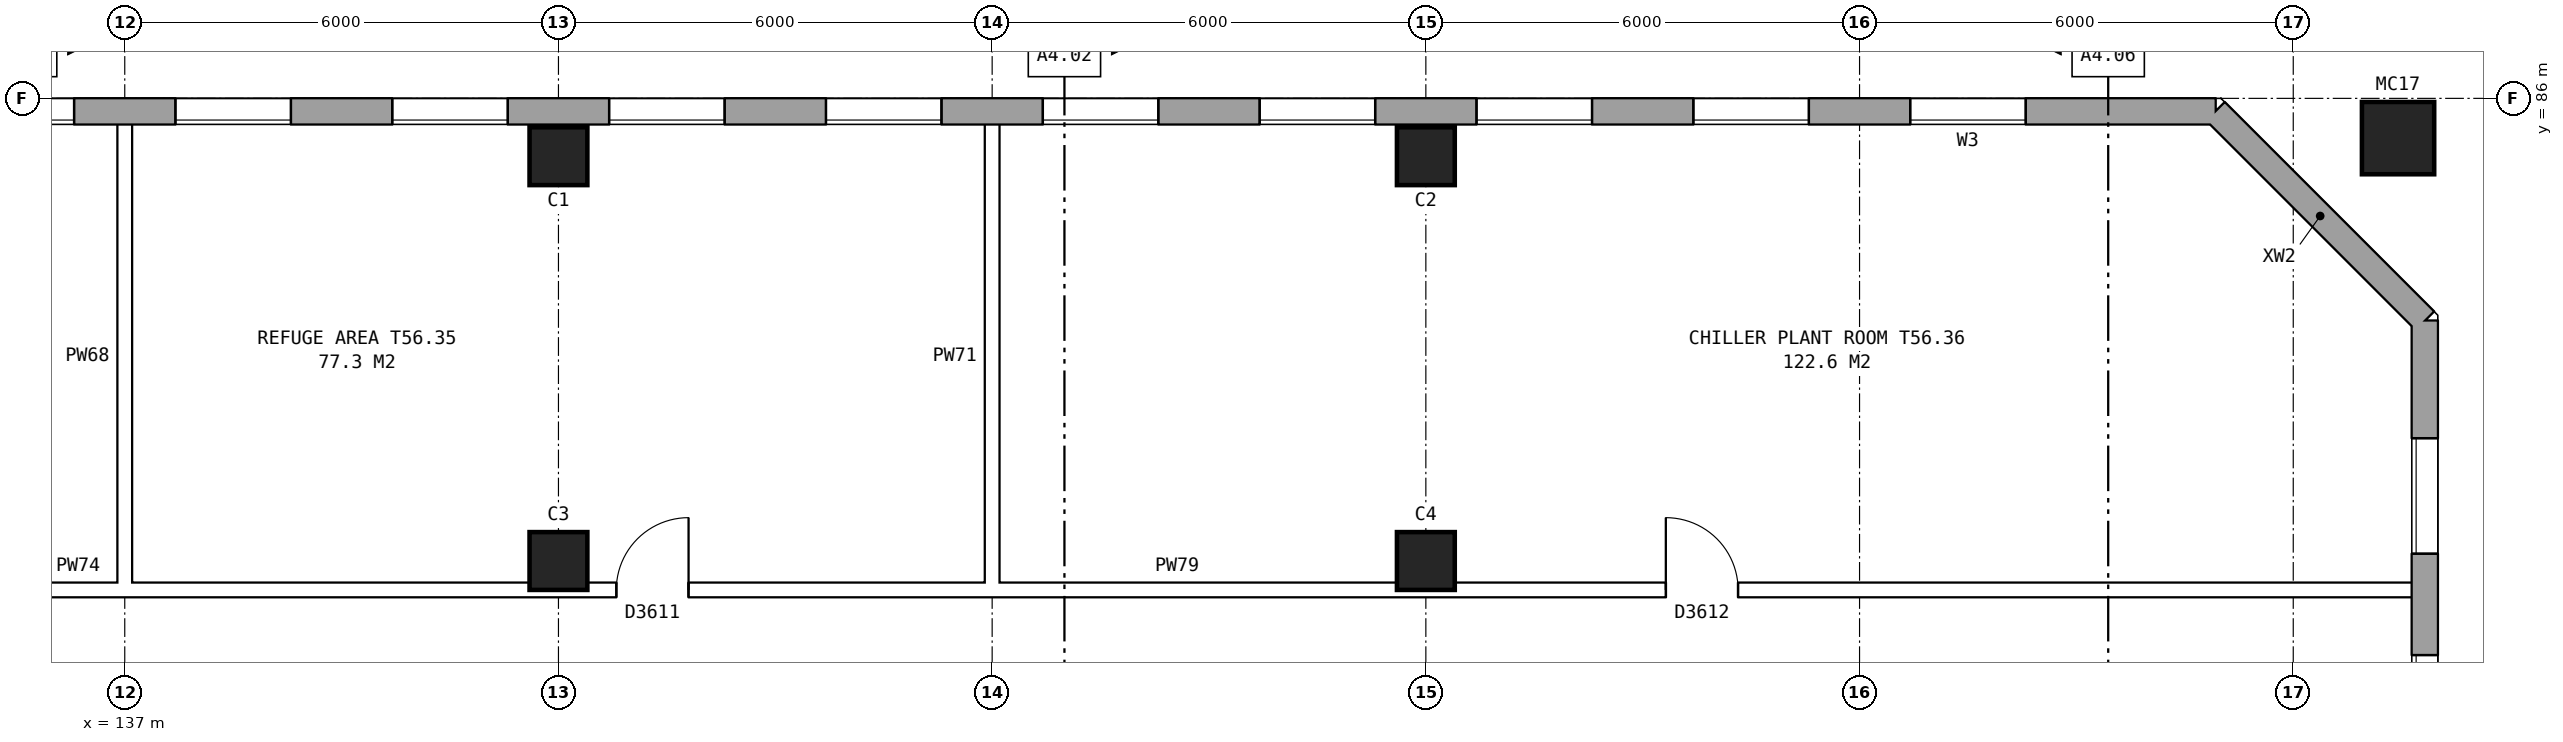
"""IFC4 building model, lengths in metres.
Left out: names, types, materials, properties, quantities, classifications, styles, units other than length and angle.
Written with IfcOpenShell. Run it as: python <this file> out.ifc"""

import sys

from ifc_helpers import new_model, si_unit, direction, frame, frame_2d, origin, origin_2d, place, context, subcontext, project, spatial, rectangle, hollow_rectangle, extrude, element, fill, save


model = new_model("IFC4")
c1 = context("Model", 3, precision=1e-05, world=origin(), true_north=direction((0.0, 1.0)))
c2 = subcontext(c1, "Body", "Model", "MODEL_VIEW")
j1 = project(units=[si_unit("LENGTHUNIT", "METRE"), si_unit("PLANEANGLEUNIT", "RADIAN")], contexts=[c1])
p1 = place(None, origin())
s1 = spatial("IfcSite", under=j1, at=p1, CompositionType="ELEMENT")
p2 = place(p1, origin())
s2 = spatial("IfcBuilding", under=s1, at=p2, CompositionType="ELEMENT")
p3 = place(p2, frame((0.0, 0.0, 198.6)))
s3 = spatial("IfcBuildingStorey", under=s2, at=p3, CompositionType="ELEMENT", Elevation=198.6)
for number, where, z_axis, x_axis in (
    (1, (143.0, 79.6, 0.0), (0.0, 0.0, 1.0), (1.0, 0.0, 0.0)),
    (2, (143.0, 85.2, 0.0), (0.0, 0.0, 1.0), (1.0, 0.0, 0.0)),
    (3, (155.0, 79.6, 0.0), (0.0, 0.0, 1.0), (1.0, 0.0, 0.0)),
    (4, (155.0, 85.2, 0.0), (0.0, 0.0, 1.0), (1.0, 0.0, 0.0)),
):
    element("IfcColumn", number, at=place(p3, frame(where, z_axis=z_axis, x_axis=x_axis)), inside=s3, PredefinedType="COLUMN", context=c2, shape_type="SweptSolid", body=[
        extrude(rectangle(XDim=0.8, YDim=0.8, at=origin_2d()), origin(), (0.0, 0.0, 1.0), 3.7),
    ])
p4 = place(p3, frame((168.45, 85.45, 0.0), z_axis=(0.0, 0.0, 1.0), x_axis=(1.0, 0.0, 0.0)))
e5 = element("IfcColumn", 5, at=p4, inside=s3, PredefinedType="COLUMN", context=c2, shape_type="SweptSolid", body=[
    extrude(hollow_rectangle(XDim=1.0, YDim=1.0, WallThickness=0.055, at=origin_2d()), origin(), (0.0, 0.0, 1.0), 4.2),
])
p5 = place(p3, frame((168.82, 57.075, 0.0), z_axis=(0.0, 0.0, 1.0), x_axis=(0.0, 1.0, 0.0)))
e6 = element("IfcWall", 6, at=p5, inside=s3, PredefinedType="STANDARD", context=c2, shape_type="SweptSolid", body=[
    extrude(rectangle(XDim=25.851, YDim=0.36, at=frame_2d((12.925, 0.0))), origin(), (0.0, 0.0, 1.0), 3.7),
])
p6 = place(p5, frame((1.625, 0.0, 1.5)))
e7 = element("IfcOpeningElement", 7, at=p6, cuts=e6, PredefinedType="OPENING", context=c2, shape_type="SweptSolid", body=[
    extrude(rectangle(XDim=1.6, YDim=1.2, at=frame_2d((0.8, 0.6))), frame((0.0, 0.19, 0.0), z_axis=(0.0, -1.0, 0.0), x_axis=(1.0, 0.0, 0.0)), (0.0, 0.0, 1.0), 0.38),
])
p7 = place(p5, frame((4.625, 0.0, 1.5)))
e8 = element("IfcOpeningElement", 8, at=p7, cuts=e6, PredefinedType="OPENING", context=c2, shape_type="SweptSolid", body=[
    extrude(rectangle(XDim=1.6, YDim=1.2, at=frame_2d((0.8, 0.6))), frame((0.0, 0.19, 0.0), z_axis=(0.0, -1.0, 0.0), x_axis=(1.0, 0.0, 0.0)), (0.0, 0.0, 1.0), 0.38),
])
p8 = place(p5, frame((19.625, 0.0, 1.5)))
e9 = element("IfcOpeningElement", 9, at=p8, cuts=e6, PredefinedType="OPENING", context=c2, shape_type="SweptSolid", body=[
    extrude(rectangle(XDim=1.6, YDim=1.2, at=frame_2d((0.8, 0.6))), frame((0.0, 0.19, 0.0), z_axis=(0.0, -1.0, 0.0), x_axis=(1.0, 0.0, 0.0)), (0.0, 0.0, 1.0), 0.38),
])
p9 = place(p5, frame((22.625, 0.0, 1.5)))
e10 = element("IfcOpeningElement", 10, at=p9, cuts=e6, PredefinedType="OPENING", context=c2, shape_type="SweptSolid", body=[
    extrude(rectangle(XDim=1.6, YDim=1.2, at=frame_2d((0.8, 0.6))), frame((0.0, 0.19, 0.0), z_axis=(0.0, -1.0, 0.0), x_axis=(1.0, 0.0, 0.0)), (0.0, 0.0, 1.0), 0.38),
])
p10 = place(p3, frame((168.82, 82.925, 0.0), z_axis=(0.0, 0.0, 1.0), x_axis=(-0.707106781187, 0.707106781187, 0.0)))
e11 = element("IfcWall", 11, at=p10, inside=s3, PredefinedType="STANDARD", context=c2, shape_type="SweptSolid", body=[
    extrude(rectangle(XDim=4.094, YDim=0.36, at=frame_2d((2.047, 0.0))), origin(), (0.0, 0.0, 1.0), 3.7),
])
p11 = place(p3, frame((165.925, 85.82, 0.0), z_axis=(0.0, 0.0, 1.0), x_axis=(-1.0, 0.0, 0.0)))
e12 = element("IfcWall", 12, at=p11, inside=s3, PredefinedType="STANDARD", context=c2, shape_type="SweptSolid", body=[
    extrude(rectangle(XDim=33.875, YDim=0.36, at=frame_2d((16.938, 0.0))), origin(), (0.0, 0.0, 1.0), 3.7),
])
p12 = place(p11, frame((2.625, 0.0, 1.5)))
e13 = element("IfcOpeningElement", 13, at=p12, cuts=e12, PredefinedType="OPENING", context=c2, shape_type="SweptSolid", body=[
    extrude(rectangle(XDim=1.6, YDim=1.2, at=frame_2d((0.8, 0.6))), frame((0.0, 0.19, 0.0), z_axis=(0.0, -1.0, 0.0), x_axis=(1.0, 0.0, 0.0)), (0.0, 0.0, 1.0), 0.38),
])
p13 = place(p11, frame((5.625, 0.0, 1.5)))
e14 = element("IfcOpeningElement", 14, at=p13, cuts=e12, PredefinedType="OPENING", context=c2, shape_type="SweptSolid", body=[
    extrude(rectangle(XDim=1.6, YDim=1.2, at=frame_2d((0.8, 0.6))), frame((0.0, 0.19, 0.0), z_axis=(0.0, -1.0, 0.0), x_axis=(1.0, 0.0, 0.0)), (0.0, 0.0, 1.0), 0.38),
])
p14 = place(p11, frame((8.625, 0.0, 1.5)))
e15 = element("IfcOpeningElement", 15, at=p14, cuts=e12, PredefinedType="OPENING", context=c2, shape_type="SweptSolid", body=[
    extrude(rectangle(XDim=1.6, YDim=1.2, at=frame_2d((0.8, 0.6))), frame((0.0, 0.19, 0.0), z_axis=(0.0, -1.0, 0.0), x_axis=(1.0, 0.0, 0.0)), (0.0, 0.0, 1.0), 0.38),
])
p15 = place(p11, frame((11.625, 0.0, 1.5)))
e16 = element("IfcOpeningElement", 16, at=p15, cuts=e12, PredefinedType="OPENING", context=c2, shape_type="SweptSolid", body=[
    extrude(rectangle(XDim=1.6, YDim=1.2, at=frame_2d((0.8, 0.6))), frame((0.0, 0.19, 0.0), z_axis=(0.0, -1.0, 0.0), x_axis=(1.0, 0.0, 0.0)), (0.0, 0.0, 1.0), 0.38),
])
p16 = place(p11, frame((14.625, 0.0, 1.5)))
e17 = element("IfcOpeningElement", 17, at=p16, cuts=e12, PredefinedType="OPENING", context=c2, shape_type="SweptSolid", body=[
    extrude(rectangle(XDim=1.6, YDim=1.2, at=frame_2d((0.8, 0.6))), frame((0.0, 0.19, 0.0), z_axis=(0.0, -1.0, 0.0), x_axis=(1.0, 0.0, 0.0)), (0.0, 0.0, 1.0), 0.38),
])
p17 = place(p11, frame((17.625, 0.0, 1.5)))
e18 = element("IfcOpeningElement", 18, at=p17, cuts=e12, PredefinedType="OPENING", context=c2, shape_type="SweptSolid", body=[
    extrude(rectangle(XDim=1.6, YDim=1.2, at=frame_2d((0.8, 0.6))), frame((0.0, 0.19, 0.0), z_axis=(0.0, -1.0, 0.0), x_axis=(1.0, 0.0, 0.0)), (0.0, 0.0, 1.0), 0.38),
])
p18 = place(p11, frame((20.625, 0.0, 1.5)))
e19 = element("IfcOpeningElement", 19, at=p18, cuts=e12, PredefinedType="OPENING", context=c2, shape_type="SweptSolid", body=[
    extrude(rectangle(XDim=1.6, YDim=1.2, at=frame_2d((0.8, 0.6))), frame((0.0, 0.19, 0.0), z_axis=(0.0, -1.0, 0.0), x_axis=(1.0, 0.0, 0.0)), (0.0, 0.0, 1.0), 0.38),
])
p19 = place(p11, frame((23.625, 0.0, 1.5)))
e20 = element("IfcOpeningElement", 20, at=p19, cuts=e12, PredefinedType="OPENING", context=c2, shape_type="SweptSolid", body=[
    extrude(rectangle(XDim=1.6, YDim=1.2, at=frame_2d((0.8, 0.6))), frame((0.0, 0.19, 0.0), z_axis=(0.0, -1.0, 0.0), x_axis=(1.0, 0.0, 0.0)), (0.0, 0.0, 1.0), 0.38),
])
p20 = place(p11, frame((26.625, 0.0, 1.5)))
e21 = element("IfcOpeningElement", 21, at=p20, cuts=e12, PredefinedType="OPENING", context=c2, shape_type="SweptSolid", body=[
    extrude(rectangle(XDim=1.6, YDim=1.2, at=frame_2d((0.8, 0.6))), frame((0.0, 0.19, 0.0), z_axis=(0.0, -1.0, 0.0), x_axis=(1.0, 0.0, 0.0)), (0.0, 0.0, 1.0), 0.38),
])
p21 = place(p11, frame((29.625, 0.0, 1.5)))
e22 = element("IfcOpeningElement", 22, at=p21, cuts=e12, PredefinedType="OPENING", context=c2, shape_type="SweptSolid", body=[
    extrude(rectangle(XDim=1.6, YDim=1.2, at=frame_2d((0.8, 0.6))), frame((0.0, 0.19, 0.0), z_axis=(0.0, -1.0, 0.0), x_axis=(1.0, 0.0, 0.0)), (0.0, 0.0, 1.0), 0.38),
])
p22 = place(p3, frame((136.9, 79.2, 0.0), z_axis=(0.0, 0.0, 1.0), x_axis=(1.0, 0.0, 0.0)))
e23 = element("IfcWall", 23, at=p22, inside=s3, PredefinedType="PARTITIONING", context=c2, shape_type="SweptSolid", body=[
    extrude(rectangle(XDim=31.86, YDim=0.2, at=frame_2d((15.93, 0.0))), origin(), (0.0, 0.0, 1.0), 3.7),
])
p23 = place(p22, frame((6.9, 0.0, 0.0)))
e24 = element("IfcOpeningElement", 24, at=p23, cuts=e23, PredefinedType="OPENING", context=c2, shape_type="SweptSolid", body=[
    extrude(rectangle(XDim=1.0, YDim=2.1, at=frame_2d((0.5, 1.05))), frame((0.0, 0.11, 0.0), z_axis=(0.0, -1.0, 0.0), x_axis=(1.0, 0.0, 0.0)), (0.0, 0.0, 1.0), 0.22),
])
p24 = place(p22, frame((21.42, 0.0, 0.0)))
e25 = element("IfcOpeningElement", 25, at=p24, cuts=e23, PredefinedType="OPENING", context=c2, shape_type="SweptSolid", body=[
    extrude(rectangle(XDim=1.0, YDim=2.1, at=frame_2d((0.5, 1.05))), frame((0.0, 0.11, 0.0), z_axis=(0.0, -1.0, 0.0), x_axis=(1.0, 0.0, 0.0)), (0.0, 0.0, 1.0), 0.22),
])
p25 = place(p3, frame((131.26, 79.2, 0.0), z_axis=(0.0, 0.0, 1.0), x_axis=(1.0, 0.0, 0.0)))
e26 = element("IfcWall", 26, at=p25, inside=s3, PredefinedType="PARTITIONING", context=c2, shape_type="SweptSolid", body=[
    extrude(rectangle(XDim=5.84, YDim=0.2, at=frame_2d((2.92, 0.0))), origin(), (0.0, 0.0, 1.0), 3.7),
])
p26 = place(p25, frame((2.42, 0.0, 0.0)))
e27 = element("IfcOpeningElement", 27, at=p26, cuts=e26, PredefinedType="OPENING", context=c2, shape_type="SweptSolid", body=[
    extrude(rectangle(XDim=1.0, YDim=2.1, at=frame_2d((0.5, 1.05))), frame((0.0, 0.11, 0.0), z_axis=(0.0, -1.0, 0.0), x_axis=(1.0, 0.0, 0.0)), (0.0, 0.0, 1.0), 0.22),
])
for number, where, z_axis, x_axis in (
    (28, (137.0, 79.1, 0.0), (0.0, 0.0, 1.0), (0.0, 1.0, 0.0)),
    (29, (149.0, 79.1, 0.0), (0.0, 0.0, 1.0), (0.0, 1.0, 0.0)),
):
    element("IfcWall", number, at=place(p3, frame(where, z_axis=z_axis, x_axis=x_axis)), inside=s3, PredefinedType="PARTITIONING", context=c2, shape_type="SweptSolid", body=[
        extrude(rectangle(XDim=6.66, YDim=0.2, at=frame_2d((3.33, 0.0))), origin(), (0.0, 0.0, 1.0), 3.7),
    ])
p27 = place(p8, origin())
e30 = element("IfcWindow", 30, at=p27, inside=s3, PartitioningType="DOUBLE_PANEL_HORIZONTAL", PredefinedType="WINDOW", context=c2, shape_type="SweptSolid", body=[
    extrude(rectangle(XDim=1.6, YDim=1.2, at=frame_2d((0.8, 0.6))), frame((0.0, 0.15, 0.0), z_axis=(0.0, -1.0, 0.0), x_axis=(1.0, 0.0, 0.0)), (0.0, 0.0, 1.0), 0.06),
])
fill(e9, e30)
p28 = place(p9, origin())
e31 = element("IfcWindow", 31, at=p28, inside=s3, PartitioningType="DOUBLE_PANEL_HORIZONTAL", PredefinedType="WINDOW", context=c2, shape_type="SweptSolid", body=[
    extrude(rectangle(XDim=1.6, YDim=1.2, at=frame_2d((0.8, 0.6))), frame((0.0, 0.15, 0.0), z_axis=(0.0, -1.0, 0.0), x_axis=(1.0, 0.0, 0.0)), (0.0, 0.0, 1.0), 0.06),
])
fill(e10, e31)
p29 = place(p12, origin())
e32 = element("IfcWindow", 32, at=p29, inside=s3, PartitioningType="DOUBLE_PANEL_HORIZONTAL", PredefinedType="WINDOW", context=c2, shape_type="SweptSolid", body=[
    extrude(rectangle(XDim=1.6, YDim=1.2, at=frame_2d((0.8, 0.6))), frame((0.0, 0.15, 0.0), z_axis=(0.0, -1.0, 0.0), x_axis=(1.0, 0.0, 0.0)), (0.0, 0.0, 1.0), 0.06),
])
fill(e13, e32)
p30 = place(p13, origin())
e33 = element("IfcWindow", 33, at=p30, inside=s3, PartitioningType="DOUBLE_PANEL_HORIZONTAL", PredefinedType="WINDOW", context=c2, shape_type="SweptSolid", body=[
    extrude(rectangle(XDim=1.6, YDim=1.2, at=frame_2d((0.8, 0.6))), frame((0.0, 0.15, 0.0), z_axis=(0.0, -1.0, 0.0), x_axis=(1.0, 0.0, 0.0)), (0.0, 0.0, 1.0), 0.06),
])
fill(e14, e33)
p31 = place(p14, origin())
e34 = element("IfcWindow", 34, at=p31, inside=s3, PartitioningType="DOUBLE_PANEL_HORIZONTAL", PredefinedType="WINDOW", context=c2, shape_type="SweptSolid", body=[
    extrude(rectangle(XDim=1.6, YDim=1.2, at=frame_2d((0.8, 0.6))), frame((0.0, 0.15, 0.0), z_axis=(0.0, -1.0, 0.0), x_axis=(1.0, 0.0, 0.0)), (0.0, 0.0, 1.0), 0.06),
])
fill(e15, e34)
p32 = place(p15, origin())
e35 = element("IfcWindow", 35, at=p32, inside=s3, PartitioningType="DOUBLE_PANEL_HORIZONTAL", PredefinedType="WINDOW", context=c2, shape_type="SweptSolid", body=[
    extrude(rectangle(XDim=1.6, YDim=1.2, at=frame_2d((0.8, 0.6))), frame((0.0, 0.15, 0.0), z_axis=(0.0, -1.0, 0.0), x_axis=(1.0, 0.0, 0.0)), (0.0, 0.0, 1.0), 0.06),
])
fill(e16, e35)
p33 = place(p16, origin())
e36 = element("IfcWindow", 36, at=p33, inside=s3, PartitioningType="DOUBLE_PANEL_HORIZONTAL", PredefinedType="WINDOW", context=c2, shape_type="SweptSolid", body=[
    extrude(rectangle(XDim=1.6, YDim=1.2, at=frame_2d((0.8, 0.6))), frame((0.0, 0.15, 0.0), z_axis=(0.0, -1.0, 0.0), x_axis=(1.0, 0.0, 0.0)), (0.0, 0.0, 1.0), 0.06),
])
fill(e17, e36)
p34 = place(p17, origin())
e37 = element("IfcWindow", 37, at=p34, inside=s3, PartitioningType="DOUBLE_PANEL_HORIZONTAL", PredefinedType="WINDOW", context=c2, shape_type="SweptSolid", body=[
    extrude(rectangle(XDim=1.6, YDim=1.2, at=frame_2d((0.8, 0.6))), frame((0.0, 0.15, 0.0), z_axis=(0.0, -1.0, 0.0), x_axis=(1.0, 0.0, 0.0)), (0.0, 0.0, 1.0), 0.06),
])
fill(e18, e37)
p35 = place(p18, origin())
e38 = element("IfcWindow", 38, at=p35, inside=s3, PartitioningType="DOUBLE_PANEL_HORIZONTAL", PredefinedType="WINDOW", context=c2, shape_type="SweptSolid", body=[
    extrude(rectangle(XDim=1.6, YDim=1.2, at=frame_2d((0.8, 0.6))), frame((0.0, 0.15, 0.0), z_axis=(0.0, -1.0, 0.0), x_axis=(1.0, 0.0, 0.0)), (0.0, 0.0, 1.0), 0.06),
])
fill(e19, e38)
p36 = place(p19, origin())
e39 = element("IfcWindow", 39, at=p36, inside=s3, PartitioningType="DOUBLE_PANEL_HORIZONTAL", PredefinedType="WINDOW", context=c2, shape_type="SweptSolid", body=[
    extrude(rectangle(XDim=1.6, YDim=1.2, at=frame_2d((0.8, 0.6))), frame((0.0, 0.15, 0.0), z_axis=(0.0, -1.0, 0.0), x_axis=(1.0, 0.0, 0.0)), (0.0, 0.0, 1.0), 0.06),
])
fill(e20, e39)
p37 = place(p20, origin())
e40 = element("IfcWindow", 40, at=p37, inside=s3, PartitioningType="DOUBLE_PANEL_HORIZONTAL", PredefinedType="WINDOW", context=c2, shape_type="SweptSolid", body=[
    extrude(rectangle(XDim=1.6, YDim=1.2, at=frame_2d((0.8, 0.6))), frame((0.0, 0.15, 0.0), z_axis=(0.0, -1.0, 0.0), x_axis=(1.0, 0.0, 0.0)), (0.0, 0.0, 1.0), 0.06),
])
fill(e21, e40)
p38 = place(p21, origin())
e41 = element("IfcWindow", 41, at=p38, inside=s3, PartitioningType="DOUBLE_PANEL_HORIZONTAL", PredefinedType="WINDOW", context=c2, shape_type="SweptSolid", body=[
    extrude(rectangle(XDim=1.6, YDim=1.2, at=frame_2d((0.8, 0.6))), frame((0.0, 0.15, 0.0), z_axis=(0.0, -1.0, 0.0), x_axis=(1.0, 0.0, 0.0)), (0.0, 0.0, 1.0), 0.06),
])
fill(e22, e41)
p39 = place(p23, origin())
e42 = element("IfcDoor", 42, at=p39, inside=s3, OperationType="SINGLE_SWING_RIGHT", PredefinedType="DOOR", context=c2, shape_type="SweptSolid", body=[
    extrude(rectangle(XDim=1.0, YDim=2.1, at=frame_2d((0.5, 1.05))), frame((0.0, 0.025, 0.0), z_axis=(0.0, -1.0, 0.0), x_axis=(1.0, 0.0, 0.0)), (0.0, 0.0, 1.0), 0.05),
])
fill(e24, e42)
p40 = place(p24, origin())
e43 = element("IfcDoor", 43, at=p40, inside=s3, OperationType="SINGLE_SWING_LEFT", PredefinedType="DOOR", context=c2, shape_type="SweptSolid", body=[
    extrude(rectangle(XDim=1.0, YDim=2.1, at=frame_2d((0.5, 1.05))), frame((0.0, 0.025, 0.0), z_axis=(0.0, -1.0, 0.0), x_axis=(1.0, 0.0, 0.0)), (0.0, 0.0, 1.0), 0.05),
])
fill(e25, e43)
save(model, sys.argv[1])
